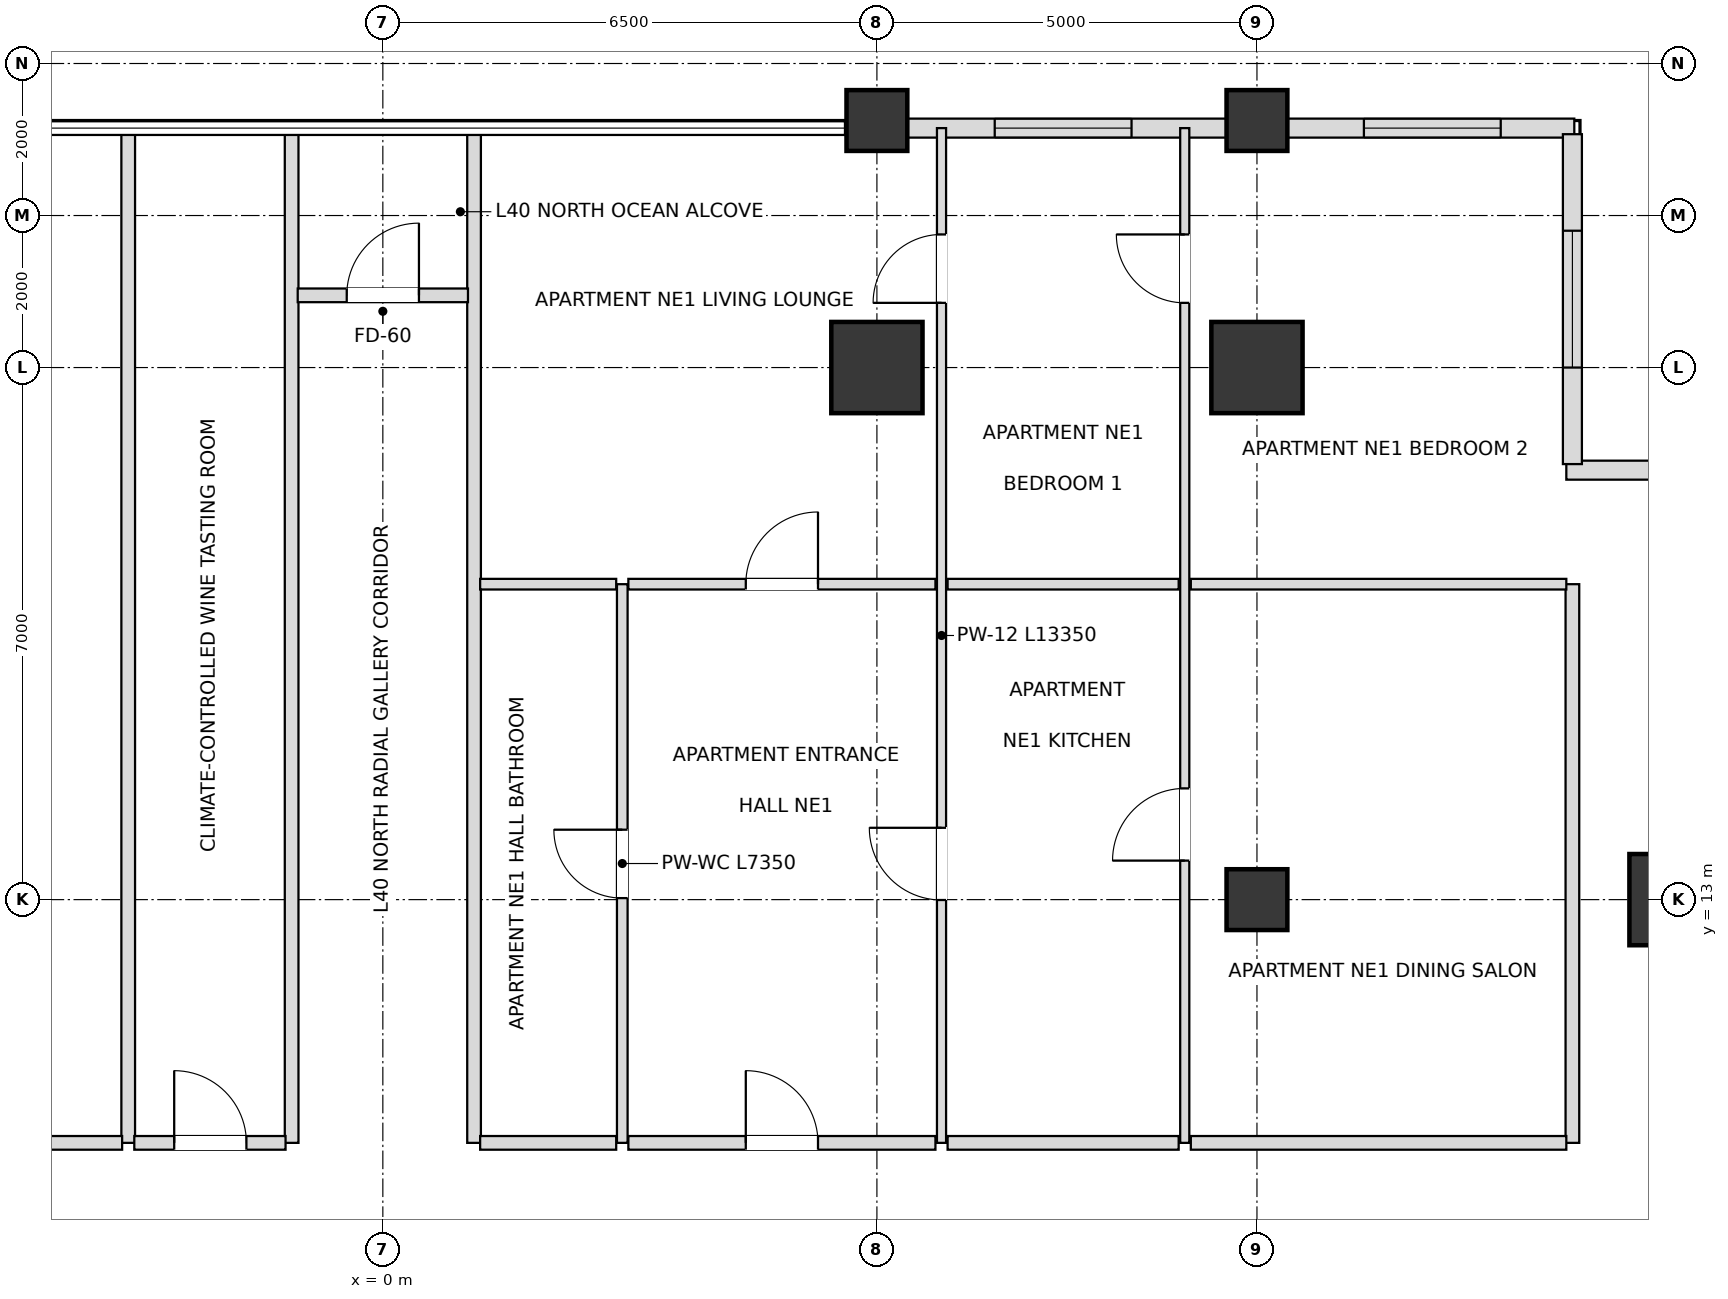
"""IFC4 building model, lengths in metres.
Left out: names, types, materials, properties, quantities, classifications, styles, units other than length and angle.
Written with IfcOpenShell. Run it as: python <this file> out.ifc"""

import sys

from ifc_helpers import new_model, si_unit, direction, frame, frame_2d, origin, origin_2d, place, context, subcontext, project, spatial, rectangle, extrude, element, fill, save


model = new_model("IFC4")
c1 = context("Model", 3, precision=1e-05, world=origin(), true_north=direction((0.0, 1.0)))
c2 = subcontext(c1, "Body", "Model", "MODEL_VIEW")
j1 = project(units=[si_unit("LENGTHUNIT", "METRE"), si_unit("PLANEANGLEUNIT", "RADIAN")], contexts=[c1])
p1 = place(None, origin())
s1 = spatial("IfcSite", under=j1, at=p1, CompositionType="ELEMENT")
p2 = place(p1, origin())
s2 = spatial("IfcBuilding", under=s1, at=p2, CompositionType="ELEMENT")
p3 = place(p2, frame((0.0, 0.0, 158.4)))
s3 = spatial("IfcBuildingStorey", under=s2, at=p3, CompositionType="ELEMENT", Elevation=158.4)
for number, where, z_axis, x_axis in (
    (1, (17.0, 13.0, 0.0), (0.0, 0.0, 1.0), (1.0, 0.0, 0.0)),
    (2, (11.5, 20.0, 0.0), (0.0, 0.0, 1.0), (1.0, 0.0, 0.0)),
    (3, (6.5, 20.0, 0.0), (0.0, 0.0, 1.0), (1.0, 0.0, 0.0)),
):
    element("IfcColumn", number, at=place(p3, frame(where, z_axis=z_axis, x_axis=x_axis)), inside=s3, PredefinedType="USERDEFINED", context=c2, shape_type="SweptSolid", body=[
        extrude(rectangle(XDim=1.2, YDim=1.2, at=origin_2d()), origin(), (0.0, 0.0, 1.0), 3.6),
    ])
for number, where, z_axis, x_axis in (
    (4, (11.5, 13.0, 0.0), (0.0, 0.0, 1.0), (1.0, 0.0, 0.0)),
    (5, (6.5, 23.25, 0.0), (0.0, 0.0, 1.0), (1.0, 0.0, 0.0)),
    (6, (11.5, 23.25, 0.0), (0.0, 0.0, 1.0), (1.0, 0.0, 0.0)),
):
    element("IfcColumn", number, at=place(p3, frame(where, z_axis=z_axis, x_axis=x_axis)), inside=s3, PredefinedType="COLUMN", context=c2, shape_type="SweptSolid", body=[
        extrude(rectangle(XDim=0.8, YDim=0.8, at=origin_2d()), origin(), (0.0, 0.0, 1.0), 3.6),
    ])
p4 = place(p3, frame((15.675, 23.15, 0.0), z_axis=(0.0, 0.0, 1.0), x_axis=(-1.0, 0.0, 0.0)))
e7 = element("IfcWall", 7, at=p4, inside=s3, PredefinedType="SOLIDWALL", context=c2, shape_type="SweptSolid", body=[
    extrude(rectangle(XDim=3.78, YDim=0.25, at=frame_2d((1.89, 0.0))), origin(), (0.0, 0.0, 1.0), 2.736),
])
p5 = place(p4, frame((0.968, 0.0, 0.72)))
e8 = element("IfcOpeningElement", 8, at=p5, cuts=e7, PredefinedType="OPENING", context=c2, shape_type="SweptSolid", body=[
    extrude(rectangle(XDim=1.8, YDim=1.68, at=frame_2d((0.9, 0.84))), frame((0.0, 0.135, 0.0), z_axis=(0.0, -1.0, 0.0), x_axis=(1.0, 0.0, 0.0)), (0.0, 0.0, 1.0), 0.27),
])
p6 = place(p3, frame((11.105, 23.15, 0.0), z_axis=(0.0, 0.0, 1.0), x_axis=(-1.0, 0.0, 0.0)))
e9 = element("IfcWall", 9, at=p6, inside=s3, PredefinedType="SOLIDWALL", context=c2, shape_type="SweptSolid", body=[
    extrude(rectangle(XDim=4.21, YDim=0.25, at=frame_2d((2.105, 0.0))), origin(), (0.0, 0.0, 1.0), 2.736),
])
p7 = place(p6, frame((1.255, 0.0, 0.72)))
e10 = element("IfcOpeningElement", 10, at=p7, cuts=e9, PredefinedType="OPENING", context=c2, shape_type="SweptSolid", body=[
    extrude(rectangle(XDim=1.8, YDim=1.68, at=frame_2d((0.9, 0.84))), frame((0.0, 0.135, 0.0), z_axis=(0.0, -1.0, 0.0), x_axis=(1.0, 0.0, 0.0)), (0.0, 0.0, 1.0), 0.27),
])
p8 = place(p3, frame((20.23, 18.65, 0.0), z_axis=(0.0, 0.0, 1.0), x_axis=(-1.0, 0.0, 0.0)))
e11 = element("IfcWall", 11, at=p8, inside=s3, PredefinedType="SOLIDWALL", context=c2, shape_type="SweptSolid", body=[
    extrude(rectangle(XDim=4.66, YDim=0.25, at=frame_2d((2.33, 0.0))), origin(), (0.0, 0.0, 1.0), 2.736),
])
p9 = place(p8, frame((1.43, 0.0, 0.72)))
e12 = element("IfcOpeningElement", 12, at=p9, cuts=e11, PredefinedType="OPENING", context=c2, shape_type="SweptSolid", body=[
    extrude(rectangle(XDim=1.8, YDim=1.68, at=frame_2d((0.9, 0.84))), frame((0.0, 0.135, 0.0), z_axis=(0.0, -1.0, 0.0), x_axis=(1.0, 0.0, 0.0)), (0.0, 0.0, 1.0), 0.27),
])
p10 = place(p3, frame((15.65, 18.73, 0.0), z_axis=(0.0, 0.0, 1.0), x_axis=(0.0, 1.0, 0.0)))
e13 = element("IfcWall", 13, at=p10, inside=s3, PredefinedType="SOLIDWALL", context=c2, shape_type="SweptSolid", body=[
    extrude(rectangle(XDim=4.34, YDim=0.25, at=frame_2d((2.17, 0.0))), origin(), (0.0, 0.0, 1.0), 2.736),
])
p11 = place(p10, frame((1.27, 0.0, 0.72)))
e14 = element("IfcOpeningElement", 14, at=p11, cuts=e13, PredefinedType="OPENING", context=c2, shape_type="SweptSolid", body=[
    extrude(rectangle(XDim=1.8, YDim=1.68, at=frame_2d((0.9, 0.84))), frame((0.0, 0.135, 0.0), z_axis=(0.0, -1.0, 0.0), x_axis=(1.0, 0.0, 0.0)), (0.0, 0.0, 1.0), 0.27),
])
for number, where, z_axis, x_axis in (
    (15, (-3.35, 9.8, 0.0), (0.0, 0.0, 1.0), (0.0, 1.0, 0.0)),
    (16, (-1.2, 9.8, 0.0), (0.0, 0.0, 1.0), (0.0, 1.0, 0.0)),
    (17, (1.2, 9.8, 0.0), (0.0, 0.0, 1.0), (0.0, 1.0, 0.0)),
):
    element("IfcWall", number, at=place(p3, frame(where, z_axis=z_axis, x_axis=x_axis)), inside=s3, PredefinedType="PARTITIONING", context=c2, shape_type="SweptSolid", body=[
        extrude(rectangle(XDim=13.35, YDim=0.18, at=frame_2d((6.675, 0.0))), origin(), (0.0, 0.0, 1.0), 2.816),
    ])
p12 = place(p3, frame((3.15, 9.8, 0.0), z_axis=(0.0, 0.0, 1.0), x_axis=(0.0, 1.0, 0.0)))
e18 = element("IfcWall", 18, at=p12, inside=s3, PredefinedType="PARTITIONING", context=c2, shape_type="SweptSolid", body=[
    extrude(rectangle(XDim=7.35, YDim=0.14, at=frame_2d((3.675, 0.0))), origin(), (0.0, 0.0, 1.0), 3.38),
])
p13 = place(p12, frame((3.22, 0.0, 0.0)))
e19 = element("IfcOpeningElement", 19, at=p13, cuts=e18, PredefinedType="OPENING", context=c2, shape_type="SweptSolid", body=[
    extrude(rectangle(XDim=0.9, YDim=2.1, at=frame_2d((0.45, 1.05))), frame((0.0, 0.08, 0.0), z_axis=(0.0, -1.0, 0.0), x_axis=(1.0, 0.0, 0.0)), (0.0, 0.0, 1.0), 0.16),
])
p14 = place(p3, frame((7.35, 9.8, 0.0), z_axis=(0.0, 0.0, 1.0), x_axis=(0.0, 1.0, 0.0)))
e20 = element("IfcWall", 20, at=p14, inside=s3, PredefinedType="PARTITIONING", context=c2, shape_type="SweptSolid", body=[
    extrude(rectangle(XDim=13.35, YDim=0.12, at=frame_2d((6.675, 0.0))), origin(), (0.0, 0.0, 1.0), 2.816),
])
p15 = place(p14, frame((3.195, 0.0, 0.0)))
e21 = element("IfcOpeningElement", 21, at=p15, cuts=e20, PredefinedType="OPENING", context=c2, shape_type="SweptSolid", body=[
    extrude(rectangle(XDim=0.95, YDim=2.1, at=frame_2d((0.475, 1.05))), frame((0.0, 0.07, 0.0), z_axis=(0.0, -1.0, 0.0), x_axis=(1.0, 0.0, 0.0)), (0.0, 0.0, 1.0), 0.14),
])
p16 = place(p14, frame((11.051, 0.0, 0.0)))
e22 = element("IfcOpeningElement", 22, at=p16, cuts=e20, PredefinedType="OPENING", context=c2, shape_type="SweptSolid", body=[
    extrude(rectangle(XDim=0.9, YDim=2.1, at=frame_2d((0.45, 1.05))), frame((0.0, 0.07, 0.0), z_axis=(0.0, -1.0, 0.0), x_axis=(1.0, 0.0, 0.0)), (0.0, 0.0, 1.0), 0.14),
])
p17 = place(p3, frame((10.55, 9.8, 0.0), z_axis=(0.0, 0.0, 1.0), x_axis=(0.0, 1.0, 0.0)))
e23 = element("IfcWall", 23, at=p17, inside=s3, PredefinedType="PARTITIONING", context=c2, shape_type="SweptSolid", body=[
    extrude(rectangle(XDim=13.35, YDim=0.12, at=frame_2d((6.675, 0.0))), origin(), (0.0, 0.0, 1.0), 2.816),
])
p18 = place(p17, frame((3.713, 0.0, 0.0)))
e24 = element("IfcOpeningElement", 24, at=p18, cuts=e23, PredefinedType="OPENING", context=c2, shape_type="SweptSolid", body=[
    extrude(rectangle(XDim=0.95, YDim=2.1, at=frame_2d((0.475, 1.05))), frame((0.0, 0.07, 0.0), z_axis=(0.0, -1.0, 0.0), x_axis=(1.0, 0.0, 0.0)), (0.0, 0.0, 1.0), 0.14),
])
p19 = place(p17, frame((11.051, 0.0, 0.0)))
e25 = element("IfcOpeningElement", 25, at=p19, cuts=e23, PredefinedType="OPENING", context=c2, shape_type="SweptSolid", body=[
    extrude(rectangle(XDim=0.9, YDim=2.1, at=frame_2d((0.45, 1.05))), frame((0.0, 0.07, 0.0), z_axis=(0.0, -1.0, 0.0), x_axis=(1.0, 0.0, 0.0)), (0.0, 0.0, 1.0), 0.14),
])
p20 = place(p3, frame((15.65, 9.8, 0.0), z_axis=(0.0, 0.0, 1.0), x_axis=(0.0, 1.0, 0.0)))
e26 = element("IfcWall", 26, at=p20, inside=s3, PredefinedType="PARTITIONING", context=c2, shape_type="SweptSolid", body=[
    extrude(rectangle(XDim=7.35, YDim=0.18, at=frame_2d((3.675, 0.0))), origin(), (0.0, 0.0, 1.0), 2.736),
])
p21 = place(p3, frame((-10.67, 9.8, 0.0), z_axis=(0.0, 0.0, 1.0), x_axis=(1.0, 0.0, 0.0)))
e27 = element("IfcWall", 27, at=p21, inside=s3, PredefinedType="PARTITIONING", context=c2, shape_type="SweptSolid", body=[
    extrude(rectangle(XDim=7.24, YDim=0.18, at=frame_2d((3.62, 0.0))), origin(), (0.0, 0.0, 1.0), 2.816),
])
p22 = place(p21, frame((3.155, 0.0, 0.0)))
e28 = element("IfcOpeningElement", 28, at=p22, cuts=e27, PredefinedType="OPENING", context=c2, shape_type="SweptSolid", body=[
    extrude(rectangle(XDim=0.95, YDim=2.15, at=frame_2d((0.475, 1.075))), frame((0.0, 0.1, 0.0), z_axis=(0.0, -1.0, 0.0), x_axis=(1.0, 0.0, 0.0)), (0.0, 0.0, 1.0), 0.2),
])
p23 = place(p3, frame((-3.27, 9.8, 0.0), z_axis=(0.0, 0.0, 1.0), x_axis=(1.0, 0.0, 0.0)))
e29 = element("IfcWall", 29, at=p23, inside=s3, PredefinedType="PARTITIONING", context=c2, shape_type="SweptSolid", body=[
    extrude(rectangle(XDim=1.99, YDim=0.18, at=frame_2d((0.995, 0.0))), origin(), (0.0, 0.0, 1.0), 3.38),
])
p24 = place(p23, frame((0.525, 0.0, 0.0)))
e30 = element("IfcOpeningElement", 30, at=p24, cuts=e29, PredefinedType="OPENING", context=c2, shape_type="SweptSolid", body=[
    extrude(rectangle(XDim=0.95, YDim=2.15, at=frame_2d((0.475, 1.075))), frame((0.0, 0.1, 0.0), z_axis=(0.0, -1.0, 0.0), x_axis=(1.0, 0.0, 0.0)), (0.0, 0.0, 1.0), 0.2),
])
p25 = place(p3, frame((1.28, 9.8, 0.0), z_axis=(0.0, 0.0, 1.0), x_axis=(1.0, 0.0, 0.0)))
e31 = element("IfcWall", 31, at=p25, inside=s3, PredefinedType="PARTITIONING", context=c2, shape_type="SweptSolid", body=[
    extrude(rectangle(XDim=1.79, YDim=0.18, at=frame_2d((0.895, 0.0))), origin(), (0.0, 0.0, 1.0), 3.38),
])
p26 = place(p3, frame((3.23, 9.8, 0.0), z_axis=(0.0, 0.0, 1.0), x_axis=(1.0, 0.0, 0.0)))
e32 = element("IfcWall", 32, at=p26, inside=s3, PredefinedType="PARTITIONING", context=c2, shape_type="SweptSolid", body=[
    extrude(rectangle(XDim=4.04, YDim=0.18, at=frame_2d((2.02, 0.0))), origin(), (0.0, 0.0, 1.0), 2.816),
])
p27 = place(p26, frame((1.545, 0.0, 0.0)))
e33 = element("IfcOpeningElement", 33, at=p27, cuts=e32, PredefinedType="OPENING", context=c2, shape_type="SweptSolid", body=[
    extrude(rectangle(XDim=0.95, YDim=2.15, at=frame_2d((0.475, 1.075))), frame((0.0, 0.1, 0.0), z_axis=(0.0, -1.0, 0.0), x_axis=(1.0, 0.0, 0.0)), (0.0, 0.0, 1.0), 0.2),
])
p28 = place(p3, frame((7.43, 9.8, 0.0), z_axis=(0.0, 0.0, 1.0), x_axis=(1.0, 0.0, 0.0)))
e34 = element("IfcWall", 34, at=p28, inside=s3, PredefinedType="PARTITIONING", context=c2, shape_type="SweptSolid", body=[
    extrude(rectangle(XDim=3.04, YDim=0.18, at=frame_2d((1.52, 0.0))), origin(), (0.0, 0.0, 1.0), 3.38),
])
p29 = place(p3, frame((10.63, 9.8, 0.0), z_axis=(0.0, 0.0, 1.0), x_axis=(1.0, 0.0, 0.0)))
e35 = element("IfcWall", 35, at=p29, inside=s3, PredefinedType="PARTITIONING", context=c2, shape_type="SweptSolid", body=[
    extrude(rectangle(XDim=4.94, YDim=0.18, at=frame_2d((2.47, 0.0))), origin(), (0.0, 0.0, 1.0), 3.38),
])
p30 = place(p3, frame((1.28, 17.15, 0.0), z_axis=(0.0, 0.0, 1.0), x_axis=(1.0, 0.0, 0.0)))
e36 = element("IfcWall", 36, at=p30, inside=s3, PredefinedType="PARTITIONING", context=c2, shape_type="SweptSolid", body=[
    extrude(rectangle(XDim=1.79, YDim=0.14, at=frame_2d((0.895, 0.0))), origin(), (0.0, 0.0, 1.0), 3.38),
])
p31 = place(p3, frame((3.23, 17.15, 0.0), z_axis=(0.0, 0.0, 1.0), x_axis=(1.0, 0.0, 0.0)))
e37 = element("IfcWall", 37, at=p31, inside=s3, PredefinedType="PARTITIONING", context=c2, shape_type="SweptSolid", body=[
    extrude(rectangle(XDim=4.04, YDim=0.14, at=frame_2d((2.02, 0.0))), origin(), (0.0, 0.0, 1.0), 2.816),
])
p32 = place(p31, frame((1.545, 0.0, 0.0)))
e38 = element("IfcOpeningElement", 38, at=p32, cuts=e37, PredefinedType="OPENING", context=c2, shape_type="SweptSolid", body=[
    extrude(rectangle(XDim=0.95, YDim=2.1, at=frame_2d((0.475, 1.05))), frame((0.0, 0.08, 0.0), z_axis=(0.0, -1.0, 0.0), x_axis=(1.0, 0.0, 0.0)), (0.0, 0.0, 1.0), 0.16),
])
p33 = place(p3, frame((7.43, 17.15, 0.0), z_axis=(0.0, 0.0, 1.0), x_axis=(1.0, 0.0, 0.0)))
e39 = element("IfcWall", 39, at=p33, inside=s3, PredefinedType="PARTITIONING", context=c2, shape_type="SweptSolid", body=[
    extrude(rectangle(XDim=3.04, YDim=0.14, at=frame_2d((1.52, 0.0))), origin(), (0.0, 0.0, 1.0), 3.38),
])
p34 = place(p3, frame((10.63, 17.15, 0.0), z_axis=(0.0, 0.0, 1.0), x_axis=(1.0, 0.0, 0.0)))
e40 = element("IfcWall", 40, at=p34, inside=s3, PredefinedType="PARTITIONING", context=c2, shape_type="SweptSolid", body=[
    extrude(rectangle(XDim=4.94, YDim=0.14, at=frame_2d((2.47, 0.0))), origin(), (0.0, 0.0, 1.0), 2.736),
])
p35 = place(p3, frame((-1.12, 20.95, 0.0), z_axis=(0.0, 0.0, 1.0), x_axis=(1.0, 0.0, 0.0)))
e41 = element("IfcWall", 41, at=p35, inside=s3, PredefinedType="PARTITIONING", context=c2, shape_type="SweptSolid", body=[
    extrude(rectangle(XDim=2.24, YDim=0.18, at=frame_2d((1.12, 0.0))), origin(), (0.0, 0.0, 1.0), 3.38),
])
p36 = place(p35, frame((0.645, 0.0, 0.0)))
e42 = element("IfcOpeningElement", 42, at=p36, cuts=e41, PredefinedType="OPENING", context=c2, shape_type="SweptSolid", body=[
    extrude(rectangle(XDim=0.95, YDim=2.15, at=frame_2d((0.475, 1.075))), frame((0.0, 0.1, 0.0), z_axis=(0.0, -1.0, 0.0), x_axis=(1.0, 0.0, 0.0)), (0.0, 0.0, 1.0), 0.2),
])
p37 = place(p5, origin())
e43 = element("IfcWindow", 43, at=p37, inside=s3, PartitioningType="SINGLE_PANEL", PredefinedType="WINDOW", context=c2, shape_type="SweptSolid", body=[
    extrude(rectangle(XDim=1.8, YDim=1.68, at=frame_2d((0.9, 0.84))), frame((0.0, 0.03, 0.0), z_axis=(0.0, -1.0, 0.0), x_axis=(1.0, 0.0, 0.0)), (0.0, 0.0, 1.0), 0.06),
])
fill(e8, e43)
p38 = place(p7, origin())
e44 = element("IfcWindow", 44, at=p38, inside=s3, PartitioningType="SINGLE_PANEL", PredefinedType="WINDOW", context=c2, shape_type="SweptSolid", body=[
    extrude(rectangle(XDim=1.8, YDim=1.68, at=frame_2d((0.9, 0.84))), frame((0.0, 0.03, 0.0), z_axis=(0.0, -1.0, 0.0), x_axis=(1.0, 0.0, 0.0)), (0.0, 0.0, 1.0), 0.06),
])
fill(e10, e44)
p39 = place(p11, origin())
e45 = element("IfcWindow", 45, at=p39, inside=s3, PartitioningType="SINGLE_PANEL", PredefinedType="WINDOW", context=c2, shape_type="SweptSolid", body=[
    extrude(rectangle(XDim=1.8, YDim=1.68, at=frame_2d((0.9, 0.84))), frame((0.0, 0.03, 0.0), z_axis=(0.0, -1.0, 0.0), x_axis=(1.0, 0.0, 0.0)), (0.0, 0.0, 1.0), 0.06),
])
fill(e14, e45)
p40 = place(p36, origin())
e46 = element("IfcDoor", 46, at=p40, inside=s3, OperationType="SINGLE_SWING_RIGHT", PredefinedType="DOOR", context=c2, shape_type="SweptSolid", body=[
    extrude(rectangle(XDim=0.95, YDim=2.15, at=frame_2d((0.475, 1.075))), frame((0.0, 0.025, 0.0), z_axis=(0.0, -1.0, 0.0), x_axis=(1.0, 0.0, 0.0)), (0.0, 0.0, 1.0), 0.05),
])
fill(e42, e46)
p41 = place(p24, origin())
e47 = element("IfcDoor", 47, at=p41, inside=s3, OperationType="SINGLE_SWING_LEFT", PredefinedType="DOOR", context=c2, shape_type="SweptSolid", body=[
    extrude(rectangle(XDim=0.95, YDim=2.15, at=frame_2d((0.475, 1.075))), frame((0.0, 0.025, 0.0), z_axis=(0.0, -1.0, 0.0), x_axis=(1.0, 0.0, 0.0)), (0.0, 0.0, 1.0), 0.05),
])
fill(e30, e47)
p42 = place(p13, origin())
e48 = element("IfcDoor", 48, at=p42, inside=s3, OperationType="SINGLE_SWING_RIGHT", PredefinedType="DOOR", context=c2, shape_type="SweptSolid", body=[
    extrude(rectangle(XDim=0.9, YDim=2.1, at=frame_2d((0.45, 1.05))), frame((0.0, 0.025, 0.0), z_axis=(0.0, -1.0, 0.0), x_axis=(1.0, 0.0, 0.0)), (0.0, 0.0, 1.0), 0.05),
])
fill(e19, e48)
p43 = place(p27, origin())
e49 = element("IfcDoor", 49, at=p43, inside=s3, OperationType="SINGLE_SWING_LEFT", PredefinedType="DOOR", context=c2, shape_type="SweptSolid", body=[
    extrude(rectangle(XDim=0.95, YDim=2.15, at=frame_2d((0.475, 1.075))), frame((0.0, 0.025, 0.0), z_axis=(0.0, -1.0, 0.0), x_axis=(1.0, 0.0, 0.0)), (0.0, 0.0, 1.0), 0.05),
])
fill(e33, e49)
p44 = place(p15, origin())
e50 = element("IfcDoor", 50, at=p44, inside=s3, OperationType="SINGLE_SWING_RIGHT", PredefinedType="DOOR", context=c2, shape_type="SweptSolid", body=[
    extrude(rectangle(XDim=0.95, YDim=2.1, at=frame_2d((0.475, 1.05))), frame((0.0, 0.025, 0.0), z_axis=(0.0, -1.0, 0.0), x_axis=(1.0, 0.0, 0.0)), (0.0, 0.0, 1.0), 0.05),
])
fill(e21, e50)
p45 = place(p18, origin())
e51 = element("IfcDoor", 51, at=p45, inside=s3, OperationType="SINGLE_SWING_LEFT", PredefinedType="DOOR", context=c2, shape_type="SweptSolid", body=[
    extrude(rectangle(XDim=0.95, YDim=2.1, at=frame_2d((0.475, 1.05))), frame((0.0, 0.025, 0.0), z_axis=(0.0, -1.0, 0.0), x_axis=(1.0, 0.0, 0.0)), (0.0, 0.0, 1.0), 0.05),
])
fill(e24, e51)
p46 = place(p32, origin())
e52 = element("IfcDoor", 52, at=p46, inside=s3, OperationType="SINGLE_SWING_RIGHT", PredefinedType="DOOR", context=c2, shape_type="SweptSolid", body=[
    extrude(rectangle(XDim=0.95, YDim=2.1, at=frame_2d((0.475, 1.05))), frame((0.0, 0.025, 0.0), z_axis=(0.0, -1.0, 0.0), x_axis=(1.0, 0.0, 0.0)), (0.0, 0.0, 1.0), 0.05),
])
fill(e38, e52)
p47 = place(p16, origin())
e53 = element("IfcDoor", 53, at=p47, inside=s3, OperationType="SINGLE_SWING_LEFT", PredefinedType="DOOR", context=c2, shape_type="SweptSolid", body=[
    extrude(rectangle(XDim=0.9, YDim=2.1, at=frame_2d((0.45, 1.05))), frame((0.0, 0.025, 0.0), z_axis=(0.0, -1.0, 0.0), x_axis=(1.0, 0.0, 0.0)), (0.0, 0.0, 1.0), 0.05),
])
fill(e22, e53)
p48 = place(p19, origin())
e54 = element("IfcDoor", 54, at=p48, inside=s3, OperationType="SINGLE_SWING_RIGHT", PredefinedType="DOOR", context=c2, shape_type="SweptSolid", body=[
    extrude(rectangle(XDim=0.9, YDim=2.1, at=frame_2d((0.45, 1.05))), frame((0.0, 0.025, 0.0), z_axis=(0.0, -1.0, 0.0), x_axis=(1.0, 0.0, 0.0)), (0.0, 0.0, 1.0), 0.05),
])
fill(e25, e54)
save(model, sys.argv[1])
